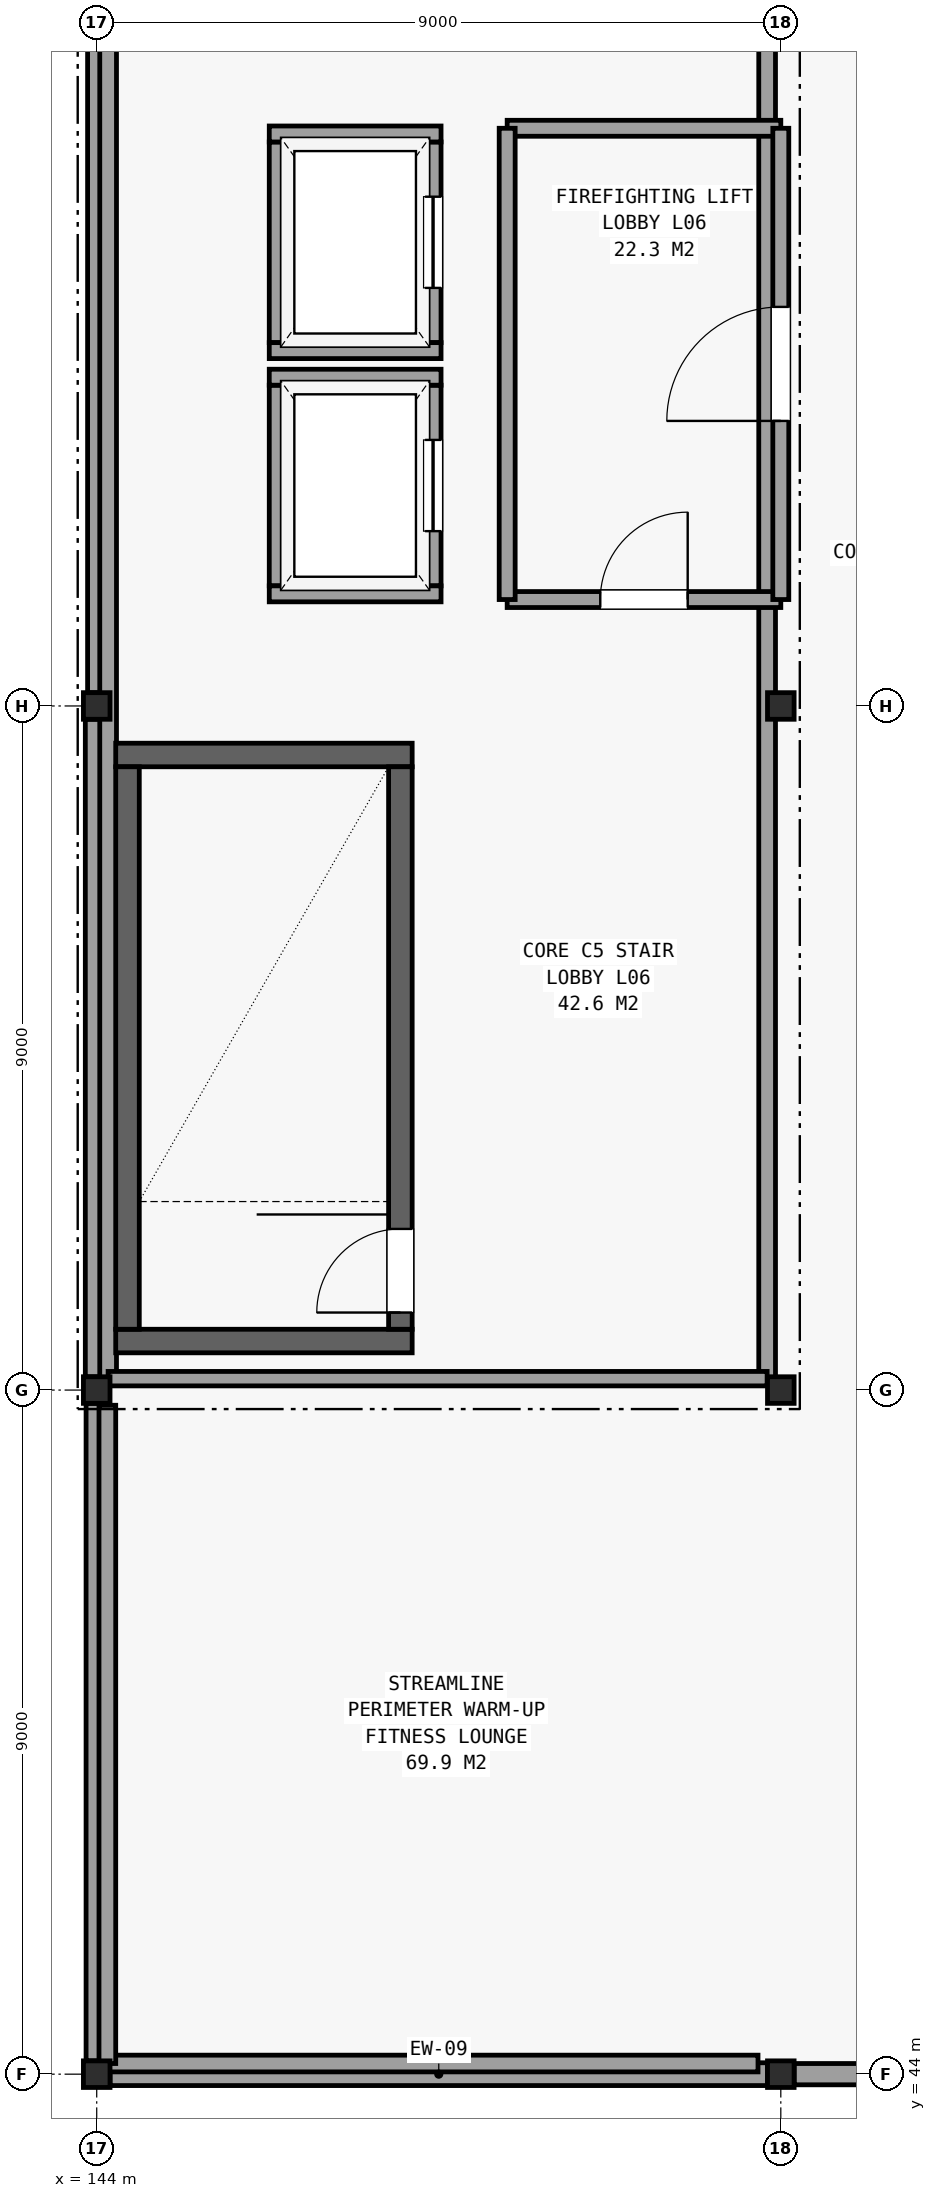
"""IFC4 building model, lengths in metres.
Left out: names, types, materials, properties, quantities, classifications, styles, units other than length and angle.
Written with IfcOpenShell. Run it as: python <this file> out.ifc"""

import sys

from ifc_helpers import new_model, si_unit, direction, frame, frame_2d, origin, origin_2d, place, context, subcontext, project, spatial, rectangle, hollow_rectangle, extrude, element, fill, save


model = new_model("IFC4")
c1 = context("Model", 3, precision=1e-05, world=origin(), true_north=direction((0.0, 1.0)))
c2 = subcontext(c1, "Body", "Model", "MODEL_VIEW")
j1 = project(units=[si_unit("LENGTHUNIT", "METRE"), si_unit("PLANEANGLEUNIT", "RADIAN")], contexts=[c1])
p1 = place(None, origin())
s1 = spatial("IfcSite", under=j1, at=p1, CompositionType="ELEMENT")
p2 = place(p1, origin())
s2 = spatial("IfcBuilding", under=s1, at=p2, CompositionType="ELEMENT")
p3 = place(p2, frame((0.0, 0.0, 26.1)))
s3 = spatial("IfcBuildingStorey", under=s2, at=p3, CompositionType="ELEMENT", Elevation=26.1)
for number, where, z_axis, x_axis in (
    (1, (144.0, 44.0, 0.0), (0.0, 0.0, 1.0), (1.0, 0.0, 0.0)),
    (2, (144.0, 53.0, 0.0), (0.0, 0.0, 1.0), (1.0, 0.0, 0.0)),
    (3, (144.0, 62.0, 0.0), (0.0, 0.0, 1.0), (1.0, 0.0, 0.0)),
    (4, (153.0, 44.0, 0.0), (0.0, 0.0, 1.0), (1.0, 0.0, 0.0)),
    (5, (153.0, 53.0, 0.0), (0.0, 0.0, 1.0), (1.0, 0.0, 0.0)),
    (6, (153.0, 62.0, 0.0), (0.0, 0.0, 1.0), (1.0, 0.0, 0.0)),
):
    element("IfcColumn", number, at=place(p3, frame(where, z_axis=z_axis, x_axis=x_axis)), inside=s3, PredefinedType="COLUMN", context=c2, shape_type="SweptSolid", body=[
        extrude(hollow_rectangle(XDim=0.35, YDim=0.35, WallThickness=0.016, at=origin_2d()), origin(), (0.0, 0.0, 1.0), 4.14),
    ])
p4 = place(p3, frame((144.175, 44.0, 0.0), z_axis=(0.0, 0.0, 1.0), x_axis=(1.0, 0.0, 0.0)))
e7 = element("IfcWall", 7, at=p4, inside=s3, PredefinedType="SOLIDWALL", context=c2, shape_type="SweptSolid", body=[
    extrude(rectangle(XDim=8.65, YDim=0.3, at=frame_2d((4.325, 0.0))), origin(), (0.0, 0.0, 1.0), 3.34),
])
p5 = place(p3, frame((153.175, 44.0, 0.0), z_axis=(0.0, 0.0, 1.0), x_axis=(1.0, 0.0, 0.0)))
e8 = element("IfcWall", 8, at=p5, inside=s3, PredefinedType="SOLIDWALL", context=c2, shape_type="SweptSolid", body=[
    extrude(rectangle(XDim=8.65, YDim=0.28, at=frame_2d((4.325, 0.0))), origin(), (0.0, 0.0, 1.0), 3.34),
])
p6 = place(p3, frame((144.0, 70.825, 0.0), z_axis=(0.0, 0.0, 1.0), x_axis=(0.0, -1.0, 0.0)))
e9 = element("IfcWall", 9, at=p6, inside=s3, PredefinedType="SOLIDWALL", context=c2, shape_type="SweptSolid", body=[
    extrude(rectangle(XDim=8.65, YDim=0.24, at=frame_2d((4.325, 0.0))), origin(), (0.0, 0.0, 1.0), 3.34),
])
p7 = place(p3, frame((144.0, 61.825, 0.0), z_axis=(0.0, 0.0, 1.0), x_axis=(0.0, -1.0, 0.0)))
e10 = element("IfcWall", 10, at=p7, inside=s3, PredefinedType="SOLIDWALL", context=c2, shape_type="SweptSolid", body=[
    extrude(rectangle(XDim=8.65, YDim=0.3, at=frame_2d((4.325, 0.0))), origin(), (0.0, 0.0, 1.0), 3.34),
])
p8 = place(p3, frame((144.0, 52.825, 0.0), z_axis=(0.0, 0.0, 1.0), x_axis=(0.0, -1.0, 0.0)))
e11 = element("IfcWall", 11, at=p8, inside=s3, PredefinedType="SOLIDWALL", context=c2, shape_type="SweptSolid", body=[
    extrude(rectangle(XDim=8.65, YDim=0.28, at=frame_2d((4.325, 0.0))), origin(), (0.0, 0.0, 1.0), 3.34),
])
p9 = place(p3, frame((152.7, 44.14, 4.2), z_axis=(0.0, 0.0, 1.0), x_axis=(-1.0, 0.0, 0.0)))
e12 = element("IfcWall", 12, at=p9, inside=s3, PredefinedType="PARAPET", context=c2, shape_type="SweptSolid", body=[
    extrude(rectangle(XDim=8.56, YDim=0.22, at=frame_2d((4.28, 0.0))), origin(), (0.0, 0.0, 1.0), 0.52),
])
p10 = place(p3, frame((144.14, 44.14, 4.2), z_axis=(0.0, 0.0, 1.0), x_axis=(0.0, 1.0, 0.0)))
e13 = element("IfcWall", 13, at=p10, inside=s3, PredefinedType="PARAPET", context=c2, shape_type="SweptSolid", body=[
    extrude(rectangle(XDim=8.66, YDim=0.22, at=frame_2d((4.33, 0.0))), origin(), (0.0, 0.0, 1.0), 0.52),
])
for number, where, z_axis, x_axis in (
    (14, (144.15, 53.15, 4.2), (0.0, 0.0, 1.0), (0.0, 1.0, 0.0)),
    (15, (152.82, 97.85, 4.2), (0.0, 0.0, 1.0), (0.0, -1.0, 0.0)),
):
    element("IfcWall", number, at=place(p3, frame(where, z_axis=z_axis, x_axis=x_axis)), inside=s3, PredefinedType="PARAPET", context=c2, shape_type="SweptSolid", body=[
        extrude(rectangle(XDim=44.7, YDim=0.22, at=frame_2d((22.35, 0.0))), origin(), (0.0, 0.0, 1.0), 0.52),
    ])
p11 = place(p3, frame((152.82, 53.15, 4.2), z_axis=(0.0, 0.0, 1.0), x_axis=(-1.0, 0.0, 0.0)))
e16 = element("IfcWall", 16, at=p11, inside=s3, PredefinedType="PARAPET", context=c2, shape_type="SweptSolid", body=[
    extrude(rectangle(XDim=8.67, YDim=0.19, at=frame_2d((4.335, 0.0))), origin(), (0.0, 0.0, 1.0), 0.52),
])
for number, where, z_axis, x_axis in (
    (17, (144.25, 53.645, 0.0), (0.0, 0.0, 1.0), (1.0, 0.0, 0.0)),
    (18, (144.25, 61.355, 0.0), (0.0, 0.0, 1.0), (1.0, 0.0, 0.0)),
):
    element("IfcWall", number, at=place(p3, frame(where, z_axis=z_axis, x_axis=x_axis)), inside=s3, PredefinedType="SHEAR", context=c2, shape_type="SweptSolid", body=[
        extrude(rectangle(XDim=3.9, YDim=0.31, at=frame_2d((1.95, 0.0))), origin(), (0.0, 0.0, 1.0), 3.94),
    ])
p12 = place(p3, frame((144.405, 53.8, 0.0), z_axis=(0.0, 0.0, 1.0), x_axis=(0.0, 1.0, 0.0)))
e19 = element("IfcWall", 19, at=p12, inside=s3, PredefinedType="SHEAR", context=c2, shape_type="SweptSolid", body=[
    extrude(rectangle(XDim=7.4, YDim=0.31, at=frame_2d((3.7, 0.0))), origin(), (0.0, 0.0, 1.0), 3.94),
])
p13 = place(p3, frame((147.995, 53.8, 0.0), z_axis=(0.0, 0.0, 1.0), x_axis=(0.0, 1.0, 0.0)))
e20 = element("IfcWall", 20, at=p13, inside=s3, PredefinedType="SHEAR", context=c2, shape_type="SweptSolid", body=[
    extrude(rectangle(XDim=7.4, YDim=0.31, at=frame_2d((3.7, 0.0))), origin(), (0.0, 0.0, 1.0), 3.94),
])
p14 = place(p13, frame((0.22, 0.0, 0.0)))
e21 = element("IfcOpeningElement", 21, at=p14, cuts=e20, PredefinedType="OPENING", context=c2, shape_type="SweptSolid", body=[
    extrude(rectangle(XDim=1.1, YDim=2.15, at=frame_2d((0.55, 1.075))), frame((0.0, 0.166, 0.0), z_axis=(0.0, -1.0, 0.0), x_axis=(1.0, 0.0, 0.0)), (0.0, 0.0, 1.0), 0.332),
])
p15 = place(p3, frame((148.425, 63.58, 0.0), z_axis=(0.0, 0.0, 1.0), x_axis=(0.0, 1.0, 0.0)))
e22 = element("IfcWall", 22, at=p15, inside=s3, PredefinedType="PARTITIONING", context=c2, shape_type="SweptSolid", body=[
    extrude(rectangle(XDim=2.64, YDim=0.21, at=frame_2d((1.32, 0.0))), origin(), (0.0, 0.0, 1.0), 3.94),
])
p16 = place(p15, frame((0.72, 0.0, 0.0)))
e23 = element("IfcOpeningElement", 23, at=p16, cuts=e22, PredefinedType="OPENING", context=c2, shape_type="SweptSolid", body=[
    extrude(rectangle(XDim=1.2, YDim=2.2, at=frame_2d((0.6, 1.1))), frame((0.0, 0.116, 0.0), z_axis=(0.0, -1.0, 0.0), x_axis=(1.0, 0.0, 0.0)), (0.0, 0.0, 1.0), 0.232),
])
p17 = place(p3, frame((146.375, 63.58, 0.0), z_axis=(0.0, 0.0, 1.0), x_axis=(0.0, 1.0, 0.0)))
e24 = element("IfcWall", 24, at=p17, inside=s3, PredefinedType="PARTITIONING", context=c2, shape_type="SweptSolid", body=[
    extrude(rectangle(XDim=2.64, YDim=0.21, at=frame_2d((1.32, 0.0))), origin(), (0.0, 0.0, 1.0), 3.94),
])
for number, where, z_axis, x_axis in (
    (25, (146.27, 63.475, 0.0), (0.0, 0.0, 1.0), (1.0, 0.0, 0.0)),
    (26, (146.27, 66.325, 0.0), (0.0, 0.0, 1.0), (1.0, 0.0, 0.0)),
):
    element("IfcWall", number, at=place(p3, frame(where, z_axis=z_axis, x_axis=x_axis)), inside=s3, PredefinedType="PARTITIONING", context=c2, shape_type="SweptSolid", body=[
        extrude(rectangle(XDim=2.26, YDim=0.21, at=frame_2d((1.13, 0.0))), origin(), (0.0, 0.0, 1.0), 3.94),
    ])
p18 = place(p3, frame((148.425, 66.78, 0.0), z_axis=(0.0, 0.0, 1.0), x_axis=(0.0, 1.0, 0.0)))
e27 = element("IfcWall", 27, at=p18, inside=s3, PredefinedType="PARTITIONING", context=c2, shape_type="SweptSolid", body=[
    extrude(rectangle(XDim=2.64, YDim=0.21, at=frame_2d((1.32, 0.0))), origin(), (0.0, 0.0, 1.0), 3.94),
])
p19 = place(p18, frame((0.72, 0.0, 0.0)))
e28 = element("IfcOpeningElement", 28, at=p19, cuts=e27, PredefinedType="OPENING", context=c2, shape_type="SweptSolid", body=[
    extrude(rectangle(XDim=1.2, YDim=2.2, at=frame_2d((0.6, 1.1))), frame((0.0, 0.116, 0.0), z_axis=(0.0, -1.0, 0.0), x_axis=(1.0, 0.0, 0.0)), (0.0, 0.0, 1.0), 0.232),
])
p20 = place(p3, frame((146.375, 66.78, 0.0), z_axis=(0.0, 0.0, 1.0), x_axis=(0.0, 1.0, 0.0)))
e29 = element("IfcWall", 29, at=p20, inside=s3, PredefinedType="PARTITIONING", context=c2, shape_type="SweptSolid", body=[
    extrude(rectangle(XDim=2.64, YDim=0.21, at=frame_2d((1.32, 0.0))), origin(), (0.0, 0.0, 1.0), 3.94),
])
for number, where, z_axis, x_axis in (
    (30, (146.27, 66.675, 0.0), (0.0, 0.0, 1.0), (1.0, 0.0, 0.0)),
    (31, (146.27, 69.525, 0.0), (0.0, 0.0, 1.0), (1.0, 0.0, 0.0)),
):
    element("IfcWall", number, at=place(p3, frame(where, z_axis=z_axis, x_axis=x_axis)), inside=s3, PredefinedType="PARTITIONING", context=c2, shape_type="SweptSolid", body=[
        extrude(rectangle(XDim=2.26, YDim=0.21, at=frame_2d((1.13, 0.0))), origin(), (0.0, 0.0, 1.0), 3.94),
    ])
p21 = place(p3, frame((149.4, 63.4, 0.0), z_axis=(0.0, 0.0, 1.0), x_axis=(1.0, 0.0, 0.0)))
e32 = element("IfcWall", 32, at=p21, inside=s3, PredefinedType="PARTITIONING", context=c2, shape_type="SweptSolid", body=[
    extrude(rectangle(XDim=3.6, YDim=0.21, at=frame_2d((1.8, 0.0))), origin(), (0.0, 0.0, 1.0), 3.94),
])
p22 = place(p21, frame((1.225, 0.0, 0.0)))
e33 = element("IfcOpeningElement", 33, at=p22, cuts=e32, PredefinedType="OPENING", context=c2, shape_type="SweptSolid", body=[
    extrude(rectangle(XDim=1.15, YDim=2.2, at=frame_2d((0.575, 1.1))), frame((0.0, 0.116, 0.0), z_axis=(0.0, -1.0, 0.0), x_axis=(1.0, 0.0, 0.0)), (0.0, 0.0, 1.0), 0.232),
])
p23 = place(p3, frame((149.4, 69.6, 0.0), z_axis=(0.0, 0.0, 1.0), x_axis=(1.0, 0.0, 0.0)))
e34 = element("IfcWall", 34, at=p23, inside=s3, PredefinedType="PARTITIONING", context=c2, shape_type="SweptSolid", body=[
    extrude(rectangle(XDim=3.6, YDim=0.21, at=frame_2d((1.8, 0.0))), origin(), (0.0, 0.0, 1.0), 3.94),
])
p24 = place(p3, frame((149.4, 63.4, 0.0), z_axis=(0.0, 0.0, 1.0), x_axis=(0.0, 1.0, 0.0)))
e35 = element("IfcWall", 35, at=p24, inside=s3, PredefinedType="PARTITIONING", context=c2, shape_type="SweptSolid", body=[
    extrude(rectangle(XDim=6.2, YDim=0.21, at=frame_2d((3.1, 0.0))), origin(), (0.0, 0.0, 1.0), 3.94),
])
p25 = place(p3, frame((153.0, 63.4, 0.0), z_axis=(0.0, 0.0, 1.0), x_axis=(0.0, 1.0, 0.0)))
e36 = element("IfcWall", 36, at=p25, inside=s3, PredefinedType="PARTITIONING", context=c2, shape_type="SweptSolid", body=[
    extrude(rectangle(XDim=6.2, YDim=0.21, at=frame_2d((3.1, 0.0))), origin(), (0.0, 0.0, 1.0), 3.94),
])
p26 = place(p25, frame((2.35, 0.0, 0.0)))
e37 = element("IfcOpeningElement", 37, at=p26, cuts=e36, PredefinedType="OPENING", context=c2, shape_type="SweptSolid", body=[
    extrude(rectangle(XDim=1.5, YDim=2.25, at=frame_2d((0.75, 1.125))), frame((0.0, 0.116, 0.0), z_axis=(0.0, -1.0, 0.0), x_axis=(1.0, 0.0, 0.0)), (0.0, 0.0, 1.0), 0.232),
])
p27 = place(p14, origin())
e38 = element("IfcDoor", 38, at=p27, inside=s3, OperationType="SINGLE_SWING_LEFT", PredefinedType="DOOR", context=c2, shape_type="SweptSolid", body=[
    extrude(rectangle(XDim=1.1, YDim=2.15, at=frame_2d((0.55, 1.075))), frame((0.0, 0.025, 0.0), z_axis=(0.0, -1.0, 0.0), x_axis=(1.0, 0.0, 0.0)), (0.0, 0.0, 1.0), 0.05),
])
fill(e21, e38)
p28 = place(p16, origin())
e39 = element("IfcDoor", 39, at=p28, inside=s3, OperationType="SLIDING_TO_LEFT", PredefinedType="DOOR", context=c2, shape_type="SweptSolid", body=[
    extrude(rectangle(XDim=1.2, YDim=2.2, at=frame_2d((0.6, 1.1))), frame((0.0, 0.025, 0.0), z_axis=(0.0, -1.0, 0.0), x_axis=(1.0, 0.0, 0.0)), (0.0, 0.0, 1.0), 0.05),
])
fill(e23, e39)
p29 = place(p19, origin())
e40 = element("IfcDoor", 40, at=p29, inside=s3, OperationType="SLIDING_TO_RIGHT", PredefinedType="DOOR", context=c2, shape_type="SweptSolid", body=[
    extrude(rectangle(XDim=1.2, YDim=2.2, at=frame_2d((0.6, 1.1))), frame((0.0, 0.025, 0.0), z_axis=(0.0, -1.0, 0.0), x_axis=(1.0, 0.0, 0.0)), (0.0, 0.0, 1.0), 0.05),
])
fill(e28, e40)
p30 = place(p22, origin())
e41 = element("IfcDoor", 41, at=p30, inside=s3, OperationType="SINGLE_SWING_RIGHT", PredefinedType="DOOR", context=c2, shape_type="SweptSolid", body=[
    extrude(rectangle(XDim=1.15, YDim=2.2, at=frame_2d((0.575, 1.1))), frame((0.0, 0.025, 0.0), z_axis=(0.0, -1.0, 0.0), x_axis=(1.0, 0.0, 0.0)), (0.0, 0.0, 1.0), 0.05),
])
fill(e33, e41)
p31 = place(p26, origin())
e42 = element("IfcDoor", 42, at=p31, inside=s3, OperationType="SINGLE_SWING_LEFT", PredefinedType="DOOR", context=c2, shape_type="SweptSolid", body=[
    extrude(rectangle(XDim=1.5, YDim=2.25, at=frame_2d((0.75, 1.125))), frame((0.0, 0.025, 0.0), z_axis=(0.0, -1.0, 0.0), x_axis=(1.0, 0.0, 0.0)), (0.0, 0.0, 1.0), 0.05),
])
fill(e37, e42)
save(model, sys.argv[1])
